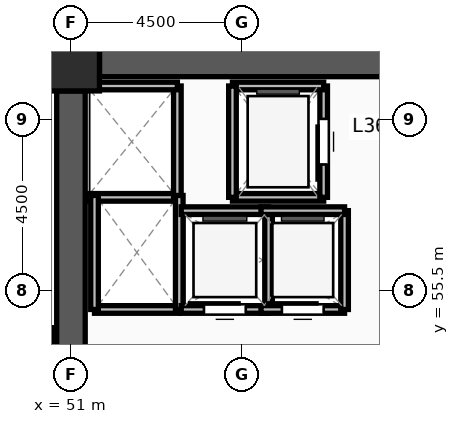
"""IFC4 building model, lengths in metres.
Left out: names, types, materials, properties, quantities, classifications, styles, units other than length and angle.
Written with IfcOpenShell. Run it as: python <this file> out.ifc"""

import sys

from ifc_helpers import new_model, si_unit, direction, frame, frame_2d, origin, origin_2d, place, context, subcontext, project, spatial, rectangle, extrude, source, transform, mapped, element, fill, save


model = new_model("IFC4")
c1 = context("Model", 3, precision=1e-05, world=origin(), true_north=direction((0.0, 1.0)))
c2 = subcontext(c1, "Body", "Model", "MODEL_VIEW")
j1 = project(units=[si_unit("LENGTHUNIT", "METRE"), si_unit("PLANEANGLEUNIT", "RADIAN")], contexts=[c1])
p1 = place(None, origin())
s1 = spatial("IfcSite", under=j1, at=p1, CompositionType="ELEMENT")
p2 = place(p1, origin())
s2 = spatial("IfcBuilding", under=s1, at=p2, CompositionType="ELEMENT")
p3 = place(p2, frame((0.0, 0.0, 139.5)))
s3 = spatial("IfcBuildingStorey", under=s2, at=p3, CompositionType="ELEMENT", Elevation=139.5)
m1 = source(origin(), c2, "Body", "SweptSolid", [
    extrude(rectangle(XDim=1.5, YDim=1.5, at=origin_2d()), origin(), (0.0, 0.0, 1.0), 4.5),
])
p4 = place(p3, frame((51.0, 61.5, 0.0), z_axis=(0.0, 0.0, 1.0), x_axis=(1.0, 0.0, 0.0)))
e1 = element("IfcColumn", 1, at=p4, inside=s3, PredefinedType="COLUMN", context=c2, shape_type="MappedRepresentation", body=[
    mapped(m1, transform((0.0, 0.0, 0.0), x_axis=(1.0, 0.0, 0.0), y_axis=(0.0, 1.0, 0.0), z_axis=(0.0, 0.0, 1.0), scale=1.0)),
])
p5 = place(p3, frame((51.75, 61.5, 0.0), z_axis=(0.0, 0.0, 1.0), x_axis=(1.0, 0.0, 0.0)))
e2 = element("IfcWall", 2, at=p5, inside=s3, PredefinedType="SHEAR", context=c2, shape_type="SweptSolid", body=[
    extrude(rectangle(XDim=7.5, YDim=0.75, at=frame_2d((3.75, 0.0))), origin(), (0.0, 0.0, 1.0), 4.32),
])
p6 = place(p3, frame((51.0, 47.25, 0.0), z_axis=(0.0, 0.0, 1.0), x_axis=(0.0, 1.0, 0.0)))
e3 = element("IfcWall", 3, at=p6, inside=s3, PredefinedType="SHEAR", context=c2, shape_type="SweptSolid", body=[
    extrude(rectangle(XDim=13.5, YDim=0.75, at=frame_2d((6.75, 0.0))), origin(), (0.0, 0.0, 1.0), 4.32),
])
p7 = place(p3, frame((55.25, 57.95, 0.0), z_axis=(0.0, 0.0, 1.0), x_axis=(1.0, 0.0, 0.0)))
e4 = element("IfcWall", 4, at=p7, inside=s3, PredefinedType="SOLIDWALL", context=c2, shape_type="SweptSolid", body=[
    extrude(rectangle(XDim=2.4, YDim=0.2, at=frame_2d((1.2, 0.0))), origin(), (0.0, 0.0, 1.0), 4.32),
])
p8 = place(p3, frame((57.65, 57.95, 0.0), z_axis=(0.0, 0.0, 1.0), x_axis=(0.0, 1.0, 0.0)))
e5 = element("IfcWall", 5, at=p8, inside=s3, PredefinedType="SOLIDWALL", context=c2, shape_type="SweptSolid", body=[
    extrude(rectangle(XDim=2.93, YDim=0.2, at=frame_2d((1.465, 0.0))), origin(), (0.0, 0.0, 1.0), 4.32),
])
m2 = source(origin(), c2, "Body", "SweptSolid", [
    extrude(rectangle(XDim=1.2, YDim=2.3, at=frame_2d((0.6, 1.15))), frame((0.0, 0.11, 0.0), z_axis=(0.0, -1.0, 0.0), x_axis=(1.0, 0.0, 0.0)), (0.0, 0.0, 1.0), 0.22),
])
p9 = place(p8, frame((0.865, 0.0, 0.0)))
e6 = element("IfcOpeningElement", 6, at=p9, cuts=e5, PredefinedType="OPENING", context=c2, shape_type="MappedRepresentation", body=[
    mapped(m2, transform((0.0, 0.0, 0.0), x_axis=(1.0, 0.0, 0.0), y_axis=(0.0, 1.0, 0.0), z_axis=(0.0, 0.0, 1.0), scale=1.0)),
])
p10 = place(p3, frame((57.65, 60.88, 0.0), z_axis=(0.0, 0.0, 1.0), x_axis=(-1.0, 0.0, 0.0)))
e7 = element("IfcWall", 7, at=p10, inside=s3, PredefinedType="SOLIDWALL", context=c2, shape_type="SweptSolid", body=[
    extrude(rectangle(XDim=2.4, YDim=0.2, at=frame_2d((1.2, 0.0))), origin(), (0.0, 0.0, 1.0), 4.32),
])
p11 = place(p3, frame((55.25, 60.88, 0.0), z_axis=(0.0, 0.0, 1.0), x_axis=(0.0, -1.0, 0.0)))
e8 = element("IfcWall", 8, at=p11, inside=s3, PredefinedType="SOLIDWALL", context=c2, shape_type="SweptSolid", body=[
    extrude(rectangle(XDim=2.93, YDim=0.2, at=frame_2d((1.465, 0.0))), origin(), (0.0, 0.0, 1.0), 4.32),
])
p12 = place(p3, frame((51.4, 57.95, 0.0), z_axis=(0.0, 0.0, 1.0), x_axis=(1.0, 0.0, 0.0)))
e9 = element("IfcWall", 9, at=p12, inside=s3, PredefinedType="SOLIDWALL", context=c2, shape_type="SweptSolid", body=[
    extrude(rectangle(XDim=2.4, YDim=0.2, at=frame_2d((1.2, 0.0))), origin(), (0.0, 0.0, 1.0), 4.32),
])
p13 = place(p3, frame((53.8, 57.95, 0.0), z_axis=(0.0, 0.0, 1.0), x_axis=(0.0, 1.0, 0.0)))
e10 = element("IfcWall", 10, at=p13, inside=s3, PredefinedType="SOLIDWALL", context=c2, shape_type="SweptSolid", body=[
    extrude(rectangle(XDim=2.93, YDim=0.2, at=frame_2d((1.465, 0.0))), origin(), (0.0, 0.0, 1.0), 4.32),
])
p14 = place(p3, frame((53.8, 60.88, 0.0), z_axis=(0.0, 0.0, 1.0), x_axis=(-1.0, 0.0, 0.0)))
e11 = element("IfcWall", 11, at=p14, inside=s3, PredefinedType="SOLIDWALL", context=c2, shape_type="SweptSolid", body=[
    extrude(rectangle(XDim=2.4, YDim=0.2, at=frame_2d((1.2, 0.0))), origin(), (0.0, 0.0, 1.0), 4.32),
])
p15 = place(p3, frame((51.62, 55.0, 0.0), z_axis=(0.0, 0.0, 1.0), x_axis=(1.0, 0.0, 0.0)))
e12 = element("IfcWall", 12, at=p15, inside=s3, PredefinedType="SOLIDWALL", context=c2, shape_type="SweptSolid", body=[
    extrude(rectangle(XDim=2.23, YDim=0.2, at=frame_2d((1.115, 0.0))), origin(), (0.0, 0.0, 1.0), 4.32),
])
for number, where, z_axis, x_axis in (
    (13, (53.85, 55.0, 0.0), (0.0, 0.0, 1.0), (0.0, 1.0, 0.0)),
    (14, (51.62, 58.0, 0.0), (0.0, 0.0, 1.0), (0.0, -1.0, 0.0)),
):
    element("IfcWall", number, at=place(p3, frame(where, z_axis=z_axis, x_axis=x_axis)), inside=s3, PredefinedType="SOLIDWALL", context=c2, shape_type="SweptSolid", body=[
        extrude(rectangle(XDim=3.0, YDim=0.2, at=frame_2d((1.5, 0.0))), origin(), (0.0, 0.0, 1.0), 4.32),
    ])
p16 = place(p3, frame((53.9, 55.0, 0.0), z_axis=(0.0, 0.0, 1.0), x_axis=(1.0, 0.0, 0.0)))
e15 = element("IfcWall", 15, at=p16, inside=s3, PredefinedType="SOLIDWALL", context=c2, shape_type="SweptSolid", body=[
    extrude(rectangle(XDim=2.3, YDim=0.2, at=frame_2d((1.15, 0.0))), origin(), (0.0, 0.0, 1.0), 4.32),
])
m3 = source(origin(), c2, "Body", "SweptSolid", [
    extrude(rectangle(XDim=1.1, YDim=2.2, at=frame_2d((0.55, 1.1))), frame((0.0, 0.11, 0.0), z_axis=(0.0, -1.0, 0.0), x_axis=(1.0, 0.0, 0.0)), (0.0, 0.0, 1.0), 0.22),
])
p17 = place(p16, frame((0.6, 0.0, 0.0)))
e16 = element("IfcOpeningElement", 16, at=p17, cuts=e15, PredefinedType="OPENING", context=c2, shape_type="MappedRepresentation", body=[
    mapped(m3, transform((0.0, 0.0, 0.0), x_axis=(1.0, 0.0, 0.0), y_axis=(0.0, 1.0, 0.0), z_axis=(0.0, 0.0, 1.0), scale=1.0)),
])
p18 = place(p3, frame((56.2, 55.0, 0.0), z_axis=(0.0, 0.0, 1.0), x_axis=(0.0, 1.0, 0.0)))
e17 = element("IfcWall", 17, at=p18, inside=s3, PredefinedType="SOLIDWALL", context=c2, shape_type="SweptSolid", body=[
    extrude(rectangle(XDim=2.6, YDim=0.2, at=frame_2d((1.3, 0.0))), origin(), (0.0, 0.0, 1.0), 4.32),
])
p19 = place(p3, frame((56.2, 57.6, 0.0), z_axis=(0.0, 0.0, 1.0), x_axis=(-1.0, 0.0, 0.0)))
e18 = element("IfcWall", 18, at=p19, inside=s3, PredefinedType="SOLIDWALL", context=c2, shape_type="SweptSolid", body=[
    extrude(rectangle(XDim=2.3, YDim=0.2, at=frame_2d((1.15, 0.0))), origin(), (0.0, 0.0, 1.0), 4.32),
])
p20 = place(p3, frame((56.0, 55.0, 0.0), z_axis=(0.0, 0.0, 1.0), x_axis=(1.0, 0.0, 0.0)))
e19 = element("IfcWall", 19, at=p20, inside=s3, PredefinedType="SOLIDWALL", context=c2, shape_type="SweptSolid", body=[
    extrude(rectangle(XDim=2.2, YDim=0.2, at=frame_2d((1.1, 0.0))), origin(), (0.0, 0.0, 1.0), 4.32),
])
p21 = place(p20, frame((0.55, 0.0, 0.0)))
e20 = element("IfcOpeningElement", 20, at=p21, cuts=e19, PredefinedType="OPENING", context=c2, shape_type="MappedRepresentation", body=[
    mapped(m3, transform((0.0, 0.0, 0.0), x_axis=(1.0, 0.0, 0.0), y_axis=(0.0, 1.0, 0.0), z_axis=(0.0, 0.0, 1.0), scale=1.0)),
])
p22 = place(p3, frame((58.2, 55.0, 0.0), z_axis=(0.0, 0.0, 1.0), x_axis=(0.0, 1.0, 0.0)))
e21 = element("IfcWall", 21, at=p22, inside=s3, PredefinedType="SOLIDWALL", context=c2, shape_type="SweptSolid", body=[
    extrude(rectangle(XDim=2.6, YDim=0.2, at=frame_2d((1.3, 0.0))), origin(), (0.0, 0.0, 1.0), 4.32),
])
p23 = place(p3, frame((58.2, 57.6, 0.0), z_axis=(0.0, 0.0, 1.0), x_axis=(-1.0, 0.0, 0.0)))
e22 = element("IfcWall", 22, at=p23, inside=s3, PredefinedType="SOLIDWALL", context=c2, shape_type="SweptSolid", body=[
    extrude(rectangle(XDim=2.2, YDim=0.2, at=frame_2d((1.1, 0.0))), origin(), (0.0, 0.0, 1.0), 4.32),
])
m4 = source(origin(), c2, "Body", "SweptSolid", [
    extrude(rectangle(XDim=1.2, YDim=2.3, at=frame_2d((0.6, 1.15))), frame((0.0, 0.025, 0.0), z_axis=(0.0, -1.0, 0.0), x_axis=(1.0, 0.0, 0.0)), (0.0, 0.0, 1.0), 0.05),
])
p24 = place(p9, origin())
e23 = element("IfcDoor", 23, at=p24, inside=s3, OperationType="SLIDING_TO_LEFT", PredefinedType="DOOR", context=c2, shape_type="MappedRepresentation", body=[
    mapped(m4, transform((0.0, 0.0, 0.0), x_axis=(1.0, 0.0, 0.0), y_axis=(0.0, 1.0, 0.0), z_axis=(0.0, 0.0, 1.0), scale=1.0)),
])
fill(e6, e23)
m5 = source(origin(), c2, "Body", "SweptSolid", [
    extrude(rectangle(XDim=1.1, YDim=2.2, at=frame_2d((0.55, 1.1))), frame((0.0, 0.025, 0.0), z_axis=(0.0, -1.0, 0.0), x_axis=(1.0, 0.0, 0.0)), (0.0, 0.0, 1.0), 0.05),
])
p25 = place(p17, origin())
e24 = element("IfcDoor", 24, at=p25, inside=s3, OperationType="SLIDING_TO_LEFT", PredefinedType="DOOR", context=c2, shape_type="MappedRepresentation", body=[
    mapped(m5, transform((0.0, 0.0, 0.0), x_axis=(1.0, 0.0, 0.0), y_axis=(0.0, 1.0, 0.0), z_axis=(0.0, 0.0, 1.0), scale=1.0)),
])
fill(e16, e24)
p26 = place(p21, origin())
e25 = element("IfcDoor", 25, at=p26, inside=s3, OperationType="SLIDING_TO_LEFT", PredefinedType="DOOR", context=c2, shape_type="MappedRepresentation", body=[
    mapped(m5, transform((0.0, 0.0, 0.0), x_axis=(1.0, 0.0, 0.0), y_axis=(0.0, 1.0, 0.0), z_axis=(0.0, 0.0, 1.0), scale=1.0)),
])
fill(e20, e25)
save(model, sys.argv[1])
